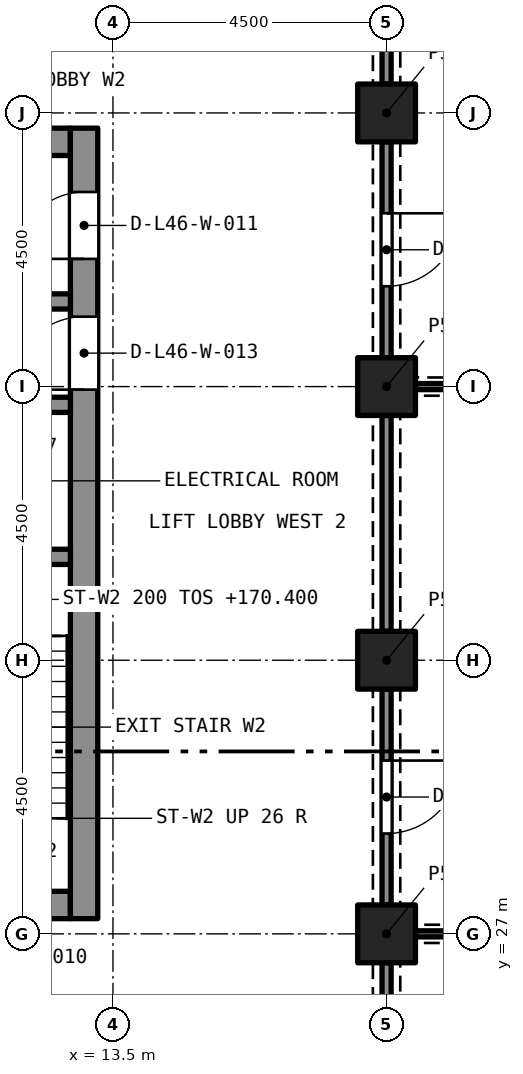
"""IFC4 building model, lengths in metres.
Left out: names, types, materials, properties, quantities, classifications, styles, units other than length and angle.
Written with IfcOpenShell. Run it as: python <this file> out.ifc"""

import sys

from ifc_helpers import new_model, si_unit, direction, frame, frame_2d, origin, origin_2d, place, context, subcontext, project, spatial, rectangle, extrude, element, fill, save


model = new_model("IFC4")
c1 = context("Model", 3, precision=1e-05, world=origin(), true_north=direction((0.0, 1.0)))
c2 = subcontext(c1, "Body", "Model", "MODEL_VIEW")
j1 = project(units=[si_unit("LENGTHUNIT", "METRE"), si_unit("PLANEANGLEUNIT", "RADIAN")], contexts=[c1])
p1 = place(None, origin())
s1 = spatial("IfcSite", under=j1, at=p1, CompositionType="ELEMENT")
p2 = place(p1, origin())
s2 = spatial("IfcBuilding", under=s1, at=p2, CompositionType="ELEMENT")
p3 = place(p2, frame((0.0, 0.0, 168.2)))
s3 = spatial("IfcBuildingStorey", under=s2, at=p3, CompositionType="ELEMENT", Elevation=168.2)
for number, where, z_axis, x_axis in (
    (1, (18.0, 27.0, 0.0), (0.0, 0.0, 1.0), (1.0, 0.0, 0.0)),
    (2, (18.0, 31.5, 0.0), (0.0, 0.0, 1.0), (1.0, 0.0, 0.0)),
    (3, (18.0, 36.0, 0.0), (0.0, 0.0, 1.0), (1.0, 0.0, 0.0)),
    (4, (18.0, 40.5, 0.0), (0.0, 0.0, 1.0), (1.0, 0.0, 0.0)),
):
    element("IfcColumn", number, at=place(p3, frame(where, z_axis=z_axis, x_axis=x_axis)), inside=s3, PredefinedType="COLUMN", context=c2, shape_type="SweptSolid", body=[
        extrude(rectangle(XDim=0.95, YDim=0.95, at=origin_2d()), origin(), (0.0, 0.0, 1.0), 4.4),
    ])
p4 = place(p3, frame((5.2, 27.475, 0.0), z_axis=(0.0, 0.0, 1.0), x_axis=(1.0, 0.0, 0.0)))
e5 = element("IfcWall", 5, at=p4, inside=s3, PredefinedType="SOLIDWALL", context=c2, shape_type="SweptSolid", body=[
    extrude(rectangle(XDim=7.6, YDim=0.45, at=frame_2d((3.8, 0.0))), origin(), (0.0, 0.0, 1.0), 4.4),
])
p5 = place(p4, frame((0.725, 0.0, 0.0)))
e6 = element("IfcOpeningElement", 6, at=p5, cuts=e5, PredefinedType="OPENING", context=c2, shape_type="SweptSolid", body=[
    extrude(rectangle(XDim=1.1, YDim=2.1, at=frame_2d((0.55, 1.05))), frame((0.0, 0.235, 0.0), z_axis=(0.0, -1.0, 0.0), x_axis=(1.0, 0.0, 0.0)), (0.0, 0.0, 1.0), 0.47),
])
p6 = place(p4, frame((3.25, 0.0, 0.0)))
e7 = element("IfcOpeningElement", 7, at=p6, cuts=e5, PredefinedType="OPENING", context=c2, shape_type="SweptSolid", body=[
    extrude(rectangle(XDim=1.1, YDim=2.1, at=frame_2d((0.55, 1.05))), frame((0.0, 0.235, 0.0), z_axis=(0.0, -1.0, 0.0), x_axis=(1.0, 0.0, 0.0)), (0.0, 0.0, 1.0), 0.47),
])
p7 = place(p4, frame((5.775, 0.0, 0.0)))
e8 = element("IfcOpeningElement", 8, at=p7, cuts=e5, PredefinedType="OPENING", context=c2, shape_type="SweptSolid", body=[
    extrude(rectangle(XDim=1.1, YDim=2.1, at=frame_2d((0.55, 1.05))), frame((0.0, 0.235, 0.0), z_axis=(0.0, -1.0, 0.0), x_axis=(1.0, 0.0, 0.0)), (0.0, 0.0, 1.0), 0.47),
])
p8 = place(p3, frame((5.2, 40.025, 0.0), z_axis=(0.0, 0.0, 1.0), x_axis=(1.0, 0.0, 0.0)))
e9 = element("IfcWall", 9, at=p8, inside=s3, PredefinedType="SOLIDWALL", context=c2, shape_type="SweptSolid", body=[
    extrude(rectangle(XDim=7.6, YDim=0.45, at=frame_2d((3.8, 0.0))), origin(), (0.0, 0.0, 1.0), 4.4),
])
p9 = place(p3, frame((13.025, 27.25, 0.0), z_axis=(0.0, 0.0, 1.0), x_axis=(0.0, 1.0, 0.0)))
e10 = element("IfcWall", 10, at=p9, inside=s3, PredefinedType="SOLIDWALL", context=c2, shape_type="SweptSolid", body=[
    extrude(rectangle(XDim=13.0, YDim=0.45, at=frame_2d((6.5, 0.0))), origin(), (0.0, 0.0, 1.0), 4.4),
])
p10 = place(p9, frame((10.85, 0.0, 0.0)))
e11 = element("IfcOpeningElement", 11, at=p10, cuts=e10, PredefinedType="OPENING", context=c2, shape_type="SweptSolid", body=[
    extrude(rectangle(XDim=1.1, YDim=2.1, at=frame_2d((0.55, 1.05))), frame((0.0, 0.235, 0.0), z_axis=(0.0, -1.0, 0.0), x_axis=(1.0, 0.0, 0.0)), (0.0, 0.0, 1.0), 0.47),
])
p11 = place(p9, frame((8.7, 0.0, 0.0)))
e12 = element("IfcOpeningElement", 12, at=p11, cuts=e10, PredefinedType="OPENING", context=c2, shape_type="SweptSolid", body=[
    extrude(rectangle(XDim=1.2, YDim=2.1, at=frame_2d((0.6, 1.05))), frame((0.0, 0.235, 0.0), z_axis=(0.0, -1.0, 0.0), x_axis=(1.0, 0.0, 0.0)), (0.0, 0.0, 1.0), 0.47),
])
p12 = place(p3, frame((5.2, 33.2, 0.0), z_axis=(0.0, 0.0, 1.0), x_axis=(1.0, 0.0, 0.0)))
e13 = element("IfcWall", 13, at=p12, inside=s3, PredefinedType="SOLIDWALL", context=c2, shape_type="SweptSolid", body=[
    extrude(rectangle(XDim=7.6, YDim=0.25, at=frame_2d((3.8, 0.0))), origin(), (0.0, 0.0, 1.0), 4.1),
])
p13 = place(p12, frame((3.3, 0.0, 0.0)))
e14 = element("IfcOpeningElement", 14, at=p13, cuts=e13, PredefinedType="OPENING", context=c2, shape_type="SweptSolid", body=[
    extrude(rectangle(XDim=1.0, YDim=2.1, at=frame_2d((0.5, 1.05))), frame((0.0, 0.135, 0.0), z_axis=(0.0, -1.0, 0.0), x_axis=(1.0, 0.0, 0.0)), (0.0, 0.0, 1.0), 0.27),
])
p14 = place(p3, frame((5.2, 35.7, 0.0), z_axis=(0.0, 0.0, 1.0), x_axis=(1.0, 0.0, 0.0)))
e15 = element("IfcWall", 15, at=p14, inside=s3, PredefinedType="SOLIDWALL", context=c2, shape_type="SweptSolid", body=[
    extrude(rectangle(XDim=7.6, YDim=0.25, at=frame_2d((3.8, 0.0))), origin(), (0.0, 0.0, 1.0), 4.1),
])
p15 = place(p14, frame((0.725, 0.0, 0.0)))
e16 = element("IfcOpeningElement", 16, at=p15, cuts=e15, PredefinedType="OPENING", context=c2, shape_type="SweptSolid", body=[
    extrude(rectangle(XDim=1.1, YDim=2.4, at=frame_2d((0.55, 1.2))), frame((0.0, 0.135, 0.0), z_axis=(0.0, -1.0, 0.0), x_axis=(1.0, 0.0, 0.0)), (0.0, 0.0, 1.0), 0.27),
])
p16 = place(p14, frame((5.875, 0.0, 0.0)))
e17 = element("IfcOpeningElement", 17, at=p16, cuts=e15, PredefinedType="OPENING", context=c2, shape_type="SweptSolid", body=[
    extrude(rectangle(XDim=0.9, YDim=2.1, at=frame_2d((0.45, 1.05))), frame((0.0, 0.135, 0.0), z_axis=(0.0, -1.0, 0.0), x_axis=(1.0, 0.0, 0.0)), (0.0, 0.0, 1.0), 0.27),
])
p17 = place(p3, frame((5.2, 37.4, 0.0), z_axis=(0.0, 0.0, 1.0), x_axis=(1.0, 0.0, 0.0)))
e18 = element("IfcWall", 18, at=p17, inside=s3, PredefinedType="SOLIDWALL", context=c2, shape_type="SweptSolid", body=[
    extrude(rectangle(XDim=7.6, YDim=0.25, at=frame_2d((3.8, 0.0))), origin(), (0.0, 0.0, 1.0), 4.1),
])
p18 = place(p17, frame((0.7, 0.0, 0.0)))
e19 = element("IfcOpeningElement", 19, at=p18, cuts=e18, PredefinedType="OPENING", context=c2, shape_type="SweptSolid", body=[
    extrude(rectangle(XDim=1.1, YDim=2.4, at=frame_2d((0.55, 1.2))), frame((0.0, 0.135, 0.0), z_axis=(0.0, -1.0, 0.0), x_axis=(1.0, 0.0, 0.0)), (0.0, 0.0, 1.0), 0.27),
])
p19 = place(p3, frame((18.475, 27.0, 0.0), z_axis=(0.0, 0.0, 1.0), x_axis=(1.0, 0.0, 0.0)))
e20 = element("IfcWall", 20, at=p19, inside=s3, PredefinedType="PARTITIONING", context=c2, shape_type="SweptSolid", body=[
    extrude(rectangle(XDim=12.55, YDim=0.1, at=frame_2d((6.275, 0.0))), origin(), (0.0, 0.0, 1.0), 3.95),
])
p20 = place(p3, frame((18.0, 26.525, 0.0), z_axis=(0.0, 0.0, 1.0), x_axis=(0.0, -1.0, 0.0)))
e21 = element("IfcWall", 21, at=p20, inside=s3, PredefinedType="PARTITIONING", context=c2, shape_type="SweptSolid", body=[
    extrude(rectangle(XDim=3.55, YDim=0.15, at=frame_2d((1.775, 0.0))), origin(), (0.0, 0.0, 1.0), 3.58),
])
p21 = place(p20, frame((1.175, 0.0, 0.0)))
e22 = element("IfcOpeningElement", 22, at=p21, cuts=e21, PredefinedType="OPENING", context=c2, shape_type="SweptSolid", body=[
    extrude(rectangle(XDim=1.2, YDim=2.1, at=frame_2d((0.6, 1.05))), frame((0.0, 0.085, 0.0), z_axis=(0.0, -1.0, 0.0), x_axis=(1.0, 0.0, 0.0)), (0.0, 0.0, 1.0), 0.17),
])
p22 = place(p3, frame((18.475, 36.0, 0.0), z_axis=(0.0, 0.0, 1.0), x_axis=(1.0, 0.0, 0.0)))
e23 = element("IfcWall", 23, at=p22, inside=s3, PredefinedType="PARTITIONING", context=c2, shape_type="SweptSolid", body=[
    extrude(rectangle(XDim=12.55, YDim=0.1, at=frame_2d((6.275, 0.0))), origin(), (0.0, 0.0, 1.0), 3.95),
])
p23 = place(p3, frame((18.0, 31.025, 0.0), z_axis=(0.0, 0.0, 1.0), x_axis=(0.0, -1.0, 0.0)))
e24 = element("IfcWall", 24, at=p23, inside=s3, PredefinedType="PARTITIONING", context=c2, shape_type="SweptSolid", body=[
    extrude(rectangle(XDim=3.55, YDim=0.15, at=frame_2d((1.775, 0.0))), origin(), (0.0, 0.0, 1.0), 3.58),
])
p24 = place(p23, frame((1.175, 0.0, 0.0)))
e25 = element("IfcOpeningElement", 25, at=p24, cuts=e24, PredefinedType="OPENING", context=c2, shape_type="SweptSolid", body=[
    extrude(rectangle(XDim=1.2, YDim=2.1, at=frame_2d((0.6, 1.05))), frame((0.0, 0.085, 0.0), z_axis=(0.0, -1.0, 0.0), x_axis=(1.0, 0.0, 0.0)), (0.0, 0.0, 1.0), 0.17),
])
p25 = place(p3, frame((18.0, 31.975, 0.0), z_axis=(0.0, 0.0, 1.0), x_axis=(0.0, 1.0, 0.0)))
e26 = element("IfcWall", 26, at=p25, inside=s3, PredefinedType="PARTITIONING", context=c2, shape_type="SweptSolid", body=[
    extrude(rectangle(XDim=3.55, YDim=0.15, at=frame_2d((1.775, 0.0))), origin(), (0.0, 0.0, 1.0), 3.58),
])
p26 = place(p3, frame((18.0, 40.025, 0.0), z_axis=(0.0, 0.0, 1.0), x_axis=(0.0, -1.0, 0.0)))
e27 = element("IfcWall", 27, at=p26, inside=s3, PredefinedType="PARTITIONING", context=c2, shape_type="SweptSolid", body=[
    extrude(rectangle(XDim=3.55, YDim=0.15, at=frame_2d((1.775, 0.0))), origin(), (0.0, 0.0, 1.0), 3.58),
])
p27 = place(p26, frame((1.175, 0.0, 0.0)))
e28 = element("IfcOpeningElement", 28, at=p27, cuts=e27, PredefinedType="OPENING", context=c2, shape_type="SweptSolid", body=[
    extrude(rectangle(XDim=1.2, YDim=2.1, at=frame_2d((0.6, 1.05))), frame((0.0, 0.085, 0.0), z_axis=(0.0, -1.0, 0.0), x_axis=(1.0, 0.0, 0.0)), (0.0, 0.0, 1.0), 0.17),
])
p28 = place(p3, frame((18.0, 40.975, 0.0), z_axis=(0.0, 0.0, 1.0), x_axis=(0.0, 1.0, 0.0)))
e29 = element("IfcWall", 29, at=p28, inside=s3, PredefinedType="PARTITIONING", context=c2, shape_type="SweptSolid", body=[
    extrude(rectangle(XDim=3.55, YDim=0.15, at=frame_2d((1.775, 0.0))), origin(), (0.0, 0.0, 1.0), 3.58),
])
p29 = place(p10, origin())
e30 = element("IfcDoor", 30, at=p29, inside=s3, OperationType="SINGLE_SWING_LEFT", PredefinedType="DOOR", context=c2, shape_type="SweptSolid", body=[
    extrude(rectangle(XDim=1.1, YDim=2.1, at=frame_2d((0.55, 1.05))), frame((0.0, 0.025, 0.0), z_axis=(0.0, -1.0, 0.0), x_axis=(1.0, 0.0, 0.0)), (0.0, 0.0, 1.0), 0.05),
])
fill(e11, e30)
p30 = place(p11, origin())
e31 = element("IfcDoor", 31, at=p30, inside=s3, OperationType="SINGLE_SWING_LEFT", PredefinedType="DOOR", context=c2, shape_type="SweptSolid", body=[
    extrude(rectangle(XDim=1.2, YDim=2.1, at=frame_2d((0.6, 1.05))), frame((0.0, 0.025, 0.0), z_axis=(0.0, -1.0, 0.0), x_axis=(1.0, 0.0, 0.0)), (0.0, 0.0, 1.0), 0.05),
])
fill(e12, e31)
p31 = place(p24, origin())
e32 = element("IfcDoor", 32, at=p31, inside=s3, OperationType="SINGLE_SWING_LEFT", PredefinedType="DOOR", context=c2, shape_type="SweptSolid", body=[
    extrude(rectangle(XDim=1.2, YDim=2.1, at=frame_2d((0.6, 1.05))), frame((0.0, 0.025, 0.0), z_axis=(0.0, -1.0, 0.0), x_axis=(1.0, 0.0, 0.0)), (0.0, 0.0, 1.0), 0.05),
])
fill(e25, e32)
p32 = place(p27, origin())
e33 = element("IfcDoor", 33, at=p32, inside=s3, OperationType="SINGLE_SWING_LEFT", PredefinedType="DOOR", context=c2, shape_type="SweptSolid", body=[
    extrude(rectangle(XDim=1.2, YDim=2.1, at=frame_2d((0.6, 1.05))), frame((0.0, 0.025, 0.0), z_axis=(0.0, -1.0, 0.0), x_axis=(1.0, 0.0, 0.0)), (0.0, 0.0, 1.0), 0.05),
])
fill(e28, e33)
save(model, sys.argv[1])
